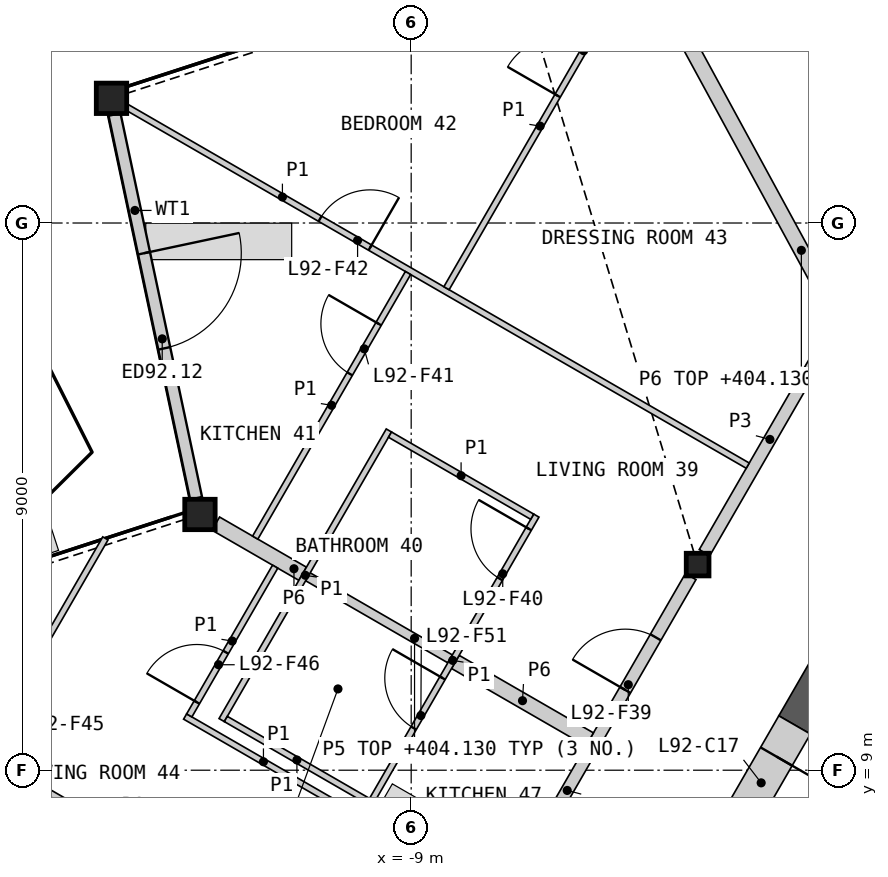
"""IFC4 building model, lengths in metres.
Left out: names, types, materials, properties, quantities, classifications, styles, units other than length and angle.
Written with IfcOpenShell. Run it as: python <this file> out.ifc"""

import sys

from ifc_helpers import new_model, si_unit, direction, frame, frame_2d, origin, origin_2d, place, context, subcontext, project, spatial, rectangle, hollow_rectangle, i_section, extrude, element, fill, save


model = new_model("IFC4")
c1 = context("Model", 3, precision=1e-05, world=origin(), true_north=direction((0.0, 1.0)))
c2 = subcontext(c1, "Body", "Model", "MODEL_VIEW")
j1 = project(units=[si_unit("LENGTHUNIT", "METRE"), si_unit("PLANEANGLEUNIT", "RADIAN")], contexts=[c1])
p1 = place(None, origin())
s1 = spatial("IfcSite", under=j1, at=p1, CompositionType="ELEMENT")
p2 = place(p1, origin())
s2 = spatial("IfcBuilding", under=s1, at=p2, CompositionType="ELEMENT")
p3 = place(p2, frame((0.0, 0.0, 401.8)))
s3 = spatial("IfcBuildingStorey", under=s2, at=p3, CompositionType="ELEMENT", Elevation=401.8)
for number, where, z_axis, x_axis in (
    (1, (-13.929, 20.051, 0.0), (0.0, 0.0, 1.0), (1.0, 0.0, 0.0)),
    (2, (-12.474, 13.206, 0.0), (0.0, 0.0, 1.0), (1.0, 0.0, 0.0)),
):
    element("IfcColumn", number, at=place(p3, frame(where, z_axis=z_axis, x_axis=x_axis)), inside=s3, PredefinedType="COLUMN", context=c2, shape_type="SweptSolid", body=[
        extrude(hollow_rectangle(XDim=0.5, YDim=0.5, WallThickness=0.03, at=origin_2d()), origin(), (0.0, 0.0, 1.0), 3.4),
    ])
p4 = place(p3, frame((-4.289, 12.382, 0.0), z_axis=(0.0, 0.0, 1.0), x_axis=(1.0, 0.0, 0.0)))
e3 = element("IfcColumn", 3, at=p4, inside=s3, PredefinedType="COLUMN", context=c2, shape_type="SweptSolid", body=[
    extrude(i_section(OverallWidth=0.374, OverallDepth=0.372, WebThickness=0.016, FlangeThickness=0.026, at=origin_2d()), origin(), (0.0, 0.0, 1.0), 3.4),
])
p5 = place(p3, frame((-13.879, 19.785, 0.0), z_axis=(0.0, 0.0, 1.0), x_axis=(0.207895859675, -0.978150965613, 0.0)))
e4 = element("IfcWall", 4, at=p5, inside=s3, PredefinedType="SOLIDWALL", context=c2, shape_type="SweptSolid", body=[
    extrude(rectangle(XDim=6.453, YDim=0.2, at=frame_2d((3.227, 0.0))), origin(), (0.0, 0.0, 1.0), 2.634),
])
p6 = place(p5, frame((2.333, 0.0, 0.0)))
e5 = element("IfcOpeningElement", 5, at=p6, cuts=e4, PredefinedType="OPENING", context=c2, shape_type="SweptSolid", body=[
    extrude(rectangle(XDim=1.6, YDim=2.25, at=frame_2d((0.8, 1.125))), frame((0.0, 0.11, 0.0), z_axis=(0.0, -1.0, 0.0), x_axis=(1.0, 0.0, 0.0)), (0.0, 0.0, 1.0), 0.22),
])
p7 = place(p3, frame((-0.26, 13.961, 0.0), z_axis=(0.0, 0.0, 1.0), x_axis=(-0.50000604952, -0.866021911064, 0.0)))
e6 = element("IfcWall", 6, at=p7, inside=s3, PredefinedType="SHEAR", context=c2, shape_type="SweptSolid", body=[
    extrude(rectangle(XDim=4.869, YDim=0.6, at=frame_2d((2.434, 0.0))), origin(), (0.0, 0.0, 1.0), 3.1),
])
p8 = place(p3, frame((-2.694, 9.745, 0.0), z_axis=(0.0, 0.0, 1.0), x_axis=(-0.50002983664, -0.866008176907, 0.0)))
e7 = element("IfcWall", 7, at=p8, inside=s3, PredefinedType="SHEAR", context=c2, shape_type="SweptSolid", body=[
    extrude(rectangle(XDim=2.2, YDim=0.6, at=frame_2d((1.1, 0.0))), origin(), (0.0, 0.0, 1.0), 3.1),
])
p9 = place(p8, frame((0.6, 0.0, 0.0)))
e8 = element("IfcOpeningElement", 8, at=p9, cuts=e7, PredefinedType="OPENING", context=c2, shape_type="SweptSolid", body=[
    extrude(rectangle(XDim=1.0, YDim=2.1, at=frame_2d((0.5, 1.05))), frame((0.0, 0.31, 0.0), z_axis=(0.0, -1.0, 0.0), x_axis=(1.0, 0.0, 0.0)), (0.0, 0.0, 1.0), 0.62),
])
p10 = place(p3, frame((-8.702, 28.797, 0.0), z_axis=(0.0, 0.0, 1.0), x_axis=(0.47791275145, -0.878407309852, 0.0)))
e9 = element("IfcWall", 9, at=p10, inside=s3, PredefinedType="PARTITIONING", context=c2, shape_type="SweptSolid", body=[
    extrude(rectangle(XDim=14.226, YDim=0.25, at=frame_2d((7.113, 0.0))), origin(), (0.0, 0.0, 1.0), 2.33),
])
p11 = place(p3, frame((-8.465, 5.15, 0.0), z_axis=(0.0, 0.0, 1.0), x_axis=(0.499992155518, 0.866029932751, 0.0)))
e10 = element("IfcWall", 10, at=p11, inside=s3, PredefinedType="PARTITIONING", context=c2, shape_type="SweptSolid", body=[
    extrude(rectangle(XDim=8.123, YDim=0.2, at=frame_2d((4.062, 0.0))), origin(), (0.0, 0.0, 1.0), 3.1),
])
p12 = place(p11, frame((5.97, 0.0, 0.0)))
e11 = element("IfcOpeningElement", 11, at=p12, cuts=e10, PredefinedType="OPENING", context=c2, shape_type="SweptSolid", body=[
    extrude(rectangle(XDim=1.0, YDim=2.1, at=frame_2d((0.5, 1.05))), frame((0.0, 0.11, 0.0), z_axis=(0.0, -1.0, 0.0), x_axis=(1.0, 0.0, 0.0)), (0.0, 0.0, 1.0), 0.22),
])
p13 = place(p11, frame((0.832, 0.0, 0.0)))
e12 = element("IfcOpeningElement", 12, at=p13, cuts=e10, PredefinedType="OPENING", context=c2, shape_type="SweptSolid", body=[
    extrude(rectangle(XDim=1.0, YDim=2.1, at=frame_2d((0.5, 1.05))), frame((0.0, 0.11, 0.0), z_axis=(0.0, -1.0, 0.0), x_axis=(1.0, 0.0, 0.0)), (0.0, 0.0, 1.0), 0.22),
])
p14 = place(p3, frame((-4.176, 12.579, 0.0), z_axis=(0.0, 0.0, 1.0), x_axis=(0.500004215162, 0.866022970146, 0.0)))
e13 = element("IfcWall", 13, at=p14, inside=s3, PredefinedType="PARTITIONING", context=c2, shape_type="SweptSolid", body=[
    extrude(rectangle(XDim=4.3, YDim=0.2, at=frame_2d((2.15, 0.0))), origin(), (0.0, 0.0, 1.0), 3.1),
])
p15 = place(p3, frame((-8.273, 10.781, 0.0), z_axis=(0.0, 0.0, 1.0), x_axis=(0.866030925526, -0.499990435942, 0.0)))
e14 = element("IfcWall", 14, at=p15, inside=s3, PredefinedType="PARTITIONING", context=c2, shape_type="SweptSolid", body=[
    extrude(rectangle(XDim=2.55, YDim=0.25, at=frame_2d((1.275, 0.0))), origin(), (0.0, 0.0, 1.0), 2.33),
])
p16 = place(p3, frame((-12.214, 13.056, 0.0), z_axis=(0.0, 0.0, 1.0), x_axis=(0.866040211805, -0.499974350878, 0.0)))
e15 = element("IfcWall", 15, at=p16, inside=s3, PredefinedType="PARTITIONING", context=c2, shape_type="SweptSolid", body=[
    extrude(rectangle(XDim=1.65, YDim=0.25, at=frame_2d((0.825, 0.0))), origin(), (0.0, 0.0, 1.0), 2.33),
])
p17 = place(p3, frame((-10.698, 12.181, 0.0), z_axis=(0.0, 0.0, 1.0), x_axis=(0.86599734893, -0.500048589285, 0.0)))
e16 = element("IfcWall", 16, at=p17, inside=s3, PredefinedType="PLUMBINGWALL", context=c2, shape_type="SweptSolid", body=[
    extrude(rectangle(XDim=2.7, YDim=0.15, at=frame_2d((1.35, 0.0))), origin(), (0.0, 0.0, 1.0), 2.33),
])
p18 = place(p3, frame((-13.669, 19.9, 0.0), z_axis=(0.0, 0.0, 1.0), x_axis=(0.866032376801, -0.499987922186, 0.0)))
e17 = element("IfcWall", 17, at=p18, inside=s3, PredefinedType="PARTITIONING", context=c2, shape_type="SweptSolid", body=[
    extrude(rectangle(XDim=11.782, YDim=0.1, at=frame_2d((5.891, 0.0))), origin(), (0.0, 0.0, 1.0), 2.33),
])
p19 = place(p18, frame((3.661, 0.0, 0.0)))
e18 = element("IfcOpeningElement", 18, at=p19, cuts=e17, PredefinedType="OPENING", context=c2, shape_type="SweptSolid", body=[
    extrude(rectangle(XDim=0.95, YDim=2.1, at=frame_2d((0.475, 1.05))), frame((0.0, 0.06, 0.0), z_axis=(0.0, -1.0, 0.0), x_axis=(1.0, 0.0, 0.0)), (0.0, 0.0, 1.0), 0.12),
])
p20 = place(p3, frame((-18.869, 10.894, 0.0), z_axis=(0.0, 0.0, 1.0), x_axis=(0.866023724155, -0.500002909193, 0.0)))
e19 = element("IfcWall", 19, at=p20, inside=s3, PredefinedType="PARTITIONING", context=c2, shape_type="SweptSolid", body=[
    extrude(rectangle(XDim=11.655, YDim=0.1, at=frame_2d((5.827, 0.0))), origin(), (0.0, 0.0, 1.0), 2.33),
])
p21 = place(p20, frame((6.453, 0.0, 0.0)))
e20 = element("IfcOpeningElement", 20, at=p21, cuts=e19, PredefinedType="OPENING", context=c2, shape_type="SweptSolid", body=[
    extrude(rectangle(XDim=0.95, YDim=2.1, at=frame_2d((0.475, 1.05))), frame((0.0, 0.06, 0.0), z_axis=(0.0, -1.0, 0.0), x_axis=(1.0, 0.0, 0.0)), (0.0, 0.0, 1.0), 0.12),
])
p22 = place(p3, frame((-8.419, 16.927, 0.0), z_axis=(0.0, 0.0, 1.0), x_axis=(0.500027893485, 0.866009298874, 0.0)))
e21 = element("IfcWall", 21, at=p22, inside=s3, PredefinedType="PARTITIONING", context=c2, shape_type="SweptSolid", body=[
    extrude(rectangle(XDim=6.158, YDim=0.1, at=frame_2d((3.079, 0.0))), origin(), (0.0, 0.0, 1.0), 2.33),
])
p23 = place(p22, frame((3.656, 0.0, 0.0)))
e22 = element("IfcOpeningElement", 22, at=p23, cuts=e21, PredefinedType="OPENING", context=c2, shape_type="SweptSolid", body=[
    extrude(rectangle(XDim=0.95, YDim=2.1, at=frame_2d((0.475, 1.05))), frame((0.0, 0.06, 0.0), z_axis=(0.0, -1.0, 0.0), x_axis=(1.0, 0.0, 0.0)), (0.0, 0.0, 1.0), 0.12),
])
p24 = place(p3, frame((-12.718, 9.883, 0.0), z_axis=(0.0, 0.0, 1.0), x_axis=(0.866017493347, -0.500013701029, 0.0)))
e23 = element("IfcWall", 23, at=p24, inside=s3, PredefinedType="PARTITIONING", context=c2, shape_type="SweptSolid", body=[
    extrude(rectangle(XDim=5.95, YDim=0.1, at=frame_2d((2.975, 0.0))), origin(), (0.0, 0.0, 1.0), 2.33),
])
p25 = place(p3, frame((-12.117, 9.824, 0.0), z_axis=(0.0, 0.0, 1.0), x_axis=(0.499996545922, 0.866027397988, 0.0)))
e24 = element("IfcWall", 24, at=p25, inside=s3, PredefinedType="PARTITIONING", context=c2, shape_type="SweptSolid", body=[
    extrude(rectangle(XDim=5.5, YDim=0.1, at=frame_2d((2.75, 0.0))), origin(), (0.0, 0.0, 1.0), 2.33),
])
p26 = place(p3, frame((-9.692, 8.425, 0.0), z_axis=(0.0, 0.0, 1.0), x_axis=(0.499996545922, 0.866027397988, 0.0)))
e25 = element("IfcWall", 25, at=p26, inside=s3, PredefinedType="PARTITIONING", context=c2, shape_type="SweptSolid", body=[
    extrude(rectangle(XDim=5.5, YDim=0.1, at=frame_2d((2.75, 0.0))), origin(), (0.0, 0.0, 1.0), 2.33),
])
p27 = place(p26, frame((4.3, 0.0, 0.0)))
e26 = element("IfcOpeningElement", 26, at=p27, cuts=e25, PredefinedType="OPENING", context=c2, shape_type="SweptSolid", body=[
    extrude(rectangle(XDim=0.95, YDim=2.1, at=frame_2d((0.475, 1.05))), frame((0.0, 0.06, 0.0), z_axis=(0.0, -1.0, 0.0), x_axis=(1.0, 0.0, 0.0)), (0.0, 0.0, 1.0), 0.12),
])
p28 = place(p26, frame((1.465, 0.0, 0.0)))
e27 = element("IfcOpeningElement", 27, at=p28, cuts=e25, PredefinedType="OPENING", context=c2, shape_type="SweptSolid", body=[
    extrude(rectangle(XDim=0.95, YDim=2.1, at=frame_2d((0.475, 1.05))), frame((0.0, 0.06, 0.0), z_axis=(0.0, -1.0, 0.0), x_axis=(1.0, 0.0, 0.0)), (0.0, 0.0, 1.0), 0.12),
])
p29 = place(p3, frame((-11.565, 12.826, 0.0), z_axis=(0.0, 0.0, 1.0), x_axis=(0.499990214365, 0.86603105345, 0.0)))
e28 = element("IfcWall", 28, at=p29, inside=s3, PredefinedType="PARTITIONING", context=c2, shape_type="SweptSolid", body=[
    extrude(rectangle(XDim=5.025, YDim=0.1, at=frame_2d((2.512, 0.0))), origin(), (0.0, 0.0, 1.0), 2.33),
])
p30 = place(p29, frame((3.11, 0.0, 0.0)))
e29 = element("IfcOpeningElement", 29, at=p30, cuts=e28, PredefinedType="OPENING", context=c2, shape_type="SweptSolid", body=[
    extrude(rectangle(XDim=0.95, YDim=2.1, at=frame_2d((0.475, 1.05))), frame((0.0, 0.06, 0.0), z_axis=(0.0, -1.0, 0.0), x_axis=(1.0, 0.0, 0.0)), (0.0, 0.0, 1.0), 0.12),
])
p31 = place(p3, frame((-16.045, 9.321, 0.0), z_axis=(0.0, 0.0, 1.0), x_axis=(0.500014251897, 0.866017175291, 0.0)))
e30 = element("IfcWall", 30, at=p31, inside=s3, PredefinedType="PARTITIONING", context=c2, shape_type="SweptSolid", body=[
    extrude(rectangle(XDim=4.032, YDim=0.1, at=frame_2d((2.016, 0.0))), origin(), (0.0, 0.0, 1.0), 2.33),
])
p32 = place(p31, frame((0.56, 0.0, 0.0)))
e31 = element("IfcOpeningElement", 31, at=p32, cuts=e30, PredefinedType="OPENING", context=c2, shape_type="SweptSolid", body=[
    extrude(rectangle(XDim=0.95, YDim=2.1, at=frame_2d((0.475, 1.05))), frame((0.0, 0.06, 0.0), z_axis=(0.0, -1.0, 0.0), x_axis=(1.0, 0.0, 0.0)), (0.0, 0.0, 1.0), 0.12),
])
p33 = place(p3, frame((-12.65, 9.901, 0.0), z_axis=(0.0, 0.0, 1.0), x_axis=(0.500024172624, 0.866011447264, 0.0)))
e32 = element("IfcWall", 32, at=p33, inside=s3, PredefinedType="PARTITIONING", context=c2, shape_type="SweptSolid", body=[
    extrude(rectangle(XDim=2.825, YDim=0.1, at=frame_2d((1.413, 0.0))), origin(), (0.0, 0.0, 1.0), 2.33),
])
p34 = place(p33, frame((0.25, 0.0, 0.0)))
e33 = element("IfcOpeningElement", 33, at=p34, cuts=e32, PredefinedType="OPENING", context=c2, shape_type="SweptSolid", body=[
    extrude(rectangle(XDim=0.95, YDim=2.1, at=frame_2d((0.475, 1.05))), frame((0.0, 0.06, 0.0), z_axis=(0.0, -1.0, 0.0), x_axis=(1.0, 0.0, 0.0)), (0.0, 0.0, 1.0), 0.12),
])
for number, where, z_axis, x_axis in (
    (34, (-9.348, 14.519, 0.0), (0.0, 0.0, 1.0), (0.866, -0.5, 0.0)),
    (35, (-12.048, 9.843, 0.0), (0.0, 0.0, 1.0), (0.866, -0.5, 0.0)),
):
    element("IfcWall", number, at=place(p3, frame(where, z_axis=z_axis, x_axis=x_axis)), inside=s3, PredefinedType="PARTITIONING", context=c2, shape_type="SweptSolid", body=[
        extrude(rectangle(XDim=2.7, YDim=0.1, at=frame_2d((1.35, 0.0))), origin(), (0.0, 0.0, 1.0), 2.33),
    ])
p35 = place(p6, origin())
e36 = element("IfcDoor", 36, at=p35, inside=s3, OperationType="DOUBLE_DOOR_SINGLE_SWING", PredefinedType="DOOR", context=c2, shape_type="SweptSolid", body=[
    extrude(rectangle(XDim=1.6, YDim=2.25, at=frame_2d((0.8, 1.125))), frame((0.0, 0.025, 0.0), z_axis=(0.0, -1.0, 0.0), x_axis=(1.0, 0.0, 0.0)), (0.0, 0.0, 1.0), 0.05),
])
fill(e5, e36)
p36 = place(p9, origin())
e37 = element("IfcDoor", 37, at=p36, inside=s3, OperationType="SINGLE_SWING_LEFT", PredefinedType="DOOR", context=c2, shape_type="SweptSolid", body=[
    extrude(rectangle(XDim=1.0, YDim=2.1, at=frame_2d((0.5, 1.05))), frame((0.0, 0.055, 0.0), z_axis=(0.0, -1.0, 0.0), x_axis=(1.0, 0.0, 0.0)), (0.0, 0.0, 1.0), 0.05),
])
fill(e8, e37)
p37 = place(p12, origin())
e38 = element("IfcDoor", 38, at=p37, inside=s3, OperationType="SINGLE_SWING_LEFT", PredefinedType="DOOR", context=c2, shape_type="SweptSolid", body=[
    extrude(rectangle(XDim=1.0, YDim=2.1, at=frame_2d((0.5, 1.05))), frame((0.0, 0.025, 0.0), z_axis=(0.0, -1.0, 0.0), x_axis=(1.0, 0.0, 0.0)), (0.0, 0.0, 1.0), 0.05),
])
fill(e11, e38)
p38 = place(p27, origin())
e39 = element("IfcDoor", 39, at=p38, inside=s3, OperationType="SINGLE_SWING_RIGHT", PredefinedType="DOOR", context=c2, shape_type="SweptSolid", body=[
    extrude(rectangle(XDim=0.95, YDim=2.1, at=frame_2d((0.475, 1.05))), frame((0.0, 0.025, 0.0), z_axis=(0.0, -1.0, 0.0), x_axis=(1.0, 0.0, 0.0)), (0.0, 0.0, 1.0), 0.05),
])
fill(e26, e39)
p39 = place(p30, origin())
e40 = element("IfcDoor", 40, at=p39, inside=s3, OperationType="SINGLE_SWING_RIGHT", PredefinedType="DOOR", context=c2, shape_type="SweptSolid", body=[
    extrude(rectangle(XDim=0.95, YDim=2.1, at=frame_2d((0.475, 1.05))), frame((0.0, 0.025, 0.0), z_axis=(0.0, -1.0, 0.0), x_axis=(1.0, 0.0, 0.0)), (0.0, 0.0, 1.0), 0.05),
])
fill(e29, e40)
p40 = place(p19, origin())
e41 = element("IfcDoor", 41, at=p40, inside=s3, OperationType="SINGLE_SWING_RIGHT", PredefinedType="DOOR", context=c2, shape_type="SweptSolid", body=[
    extrude(rectangle(XDim=0.95, YDim=2.1, at=frame_2d((0.475, 1.05))), frame((0.0, 0.025, 0.0), z_axis=(0.0, -1.0, 0.0), x_axis=(1.0, 0.0, 0.0)), (0.0, 0.0, 1.0), 0.05),
])
fill(e18, e41)
p41 = place(p23, origin())
e42 = element("IfcDoor", 42, at=p41, inside=s3, OperationType="SINGLE_SWING_LEFT", PredefinedType="DOOR", context=c2, shape_type="SweptSolid", body=[
    extrude(rectangle(XDim=0.95, YDim=2.1, at=frame_2d((0.475, 1.05))), frame((0.0, 0.025, 0.0), z_axis=(0.0, -1.0, 0.0), x_axis=(1.0, 0.0, 0.0)), (0.0, 0.0, 1.0), 0.05),
])
fill(e22, e42)
p42 = place(p34, origin())
e43 = element("IfcDoor", 43, at=p42, inside=s3, OperationType="SINGLE_SWING_LEFT", PredefinedType="DOOR", context=c2, shape_type="SweptSolid", body=[
    extrude(rectangle(XDim=0.95, YDim=2.1, at=frame_2d((0.475, 1.05))), frame((0.0, 0.025, 0.0), z_axis=(0.0, -1.0, 0.0), x_axis=(1.0, 0.0, 0.0)), (0.0, 0.0, 1.0), 0.05),
])
fill(e33, e43)
p43 = place(p28, origin())
e44 = element("IfcDoor", 44, at=p43, inside=s3, OperationType="SINGLE_SWING_RIGHT", PredefinedType="DOOR", context=c2, shape_type="SweptSolid", body=[
    extrude(rectangle(XDim=0.95, YDim=2.1, at=frame_2d((0.475, 1.05))), frame((0.0, 0.025, 0.0), z_axis=(0.0, -1.0, 0.0), x_axis=(1.0, 0.0, 0.0)), (0.0, 0.0, 1.0), 0.05),
])
fill(e27, e44)
save(model, sys.argv[1])
